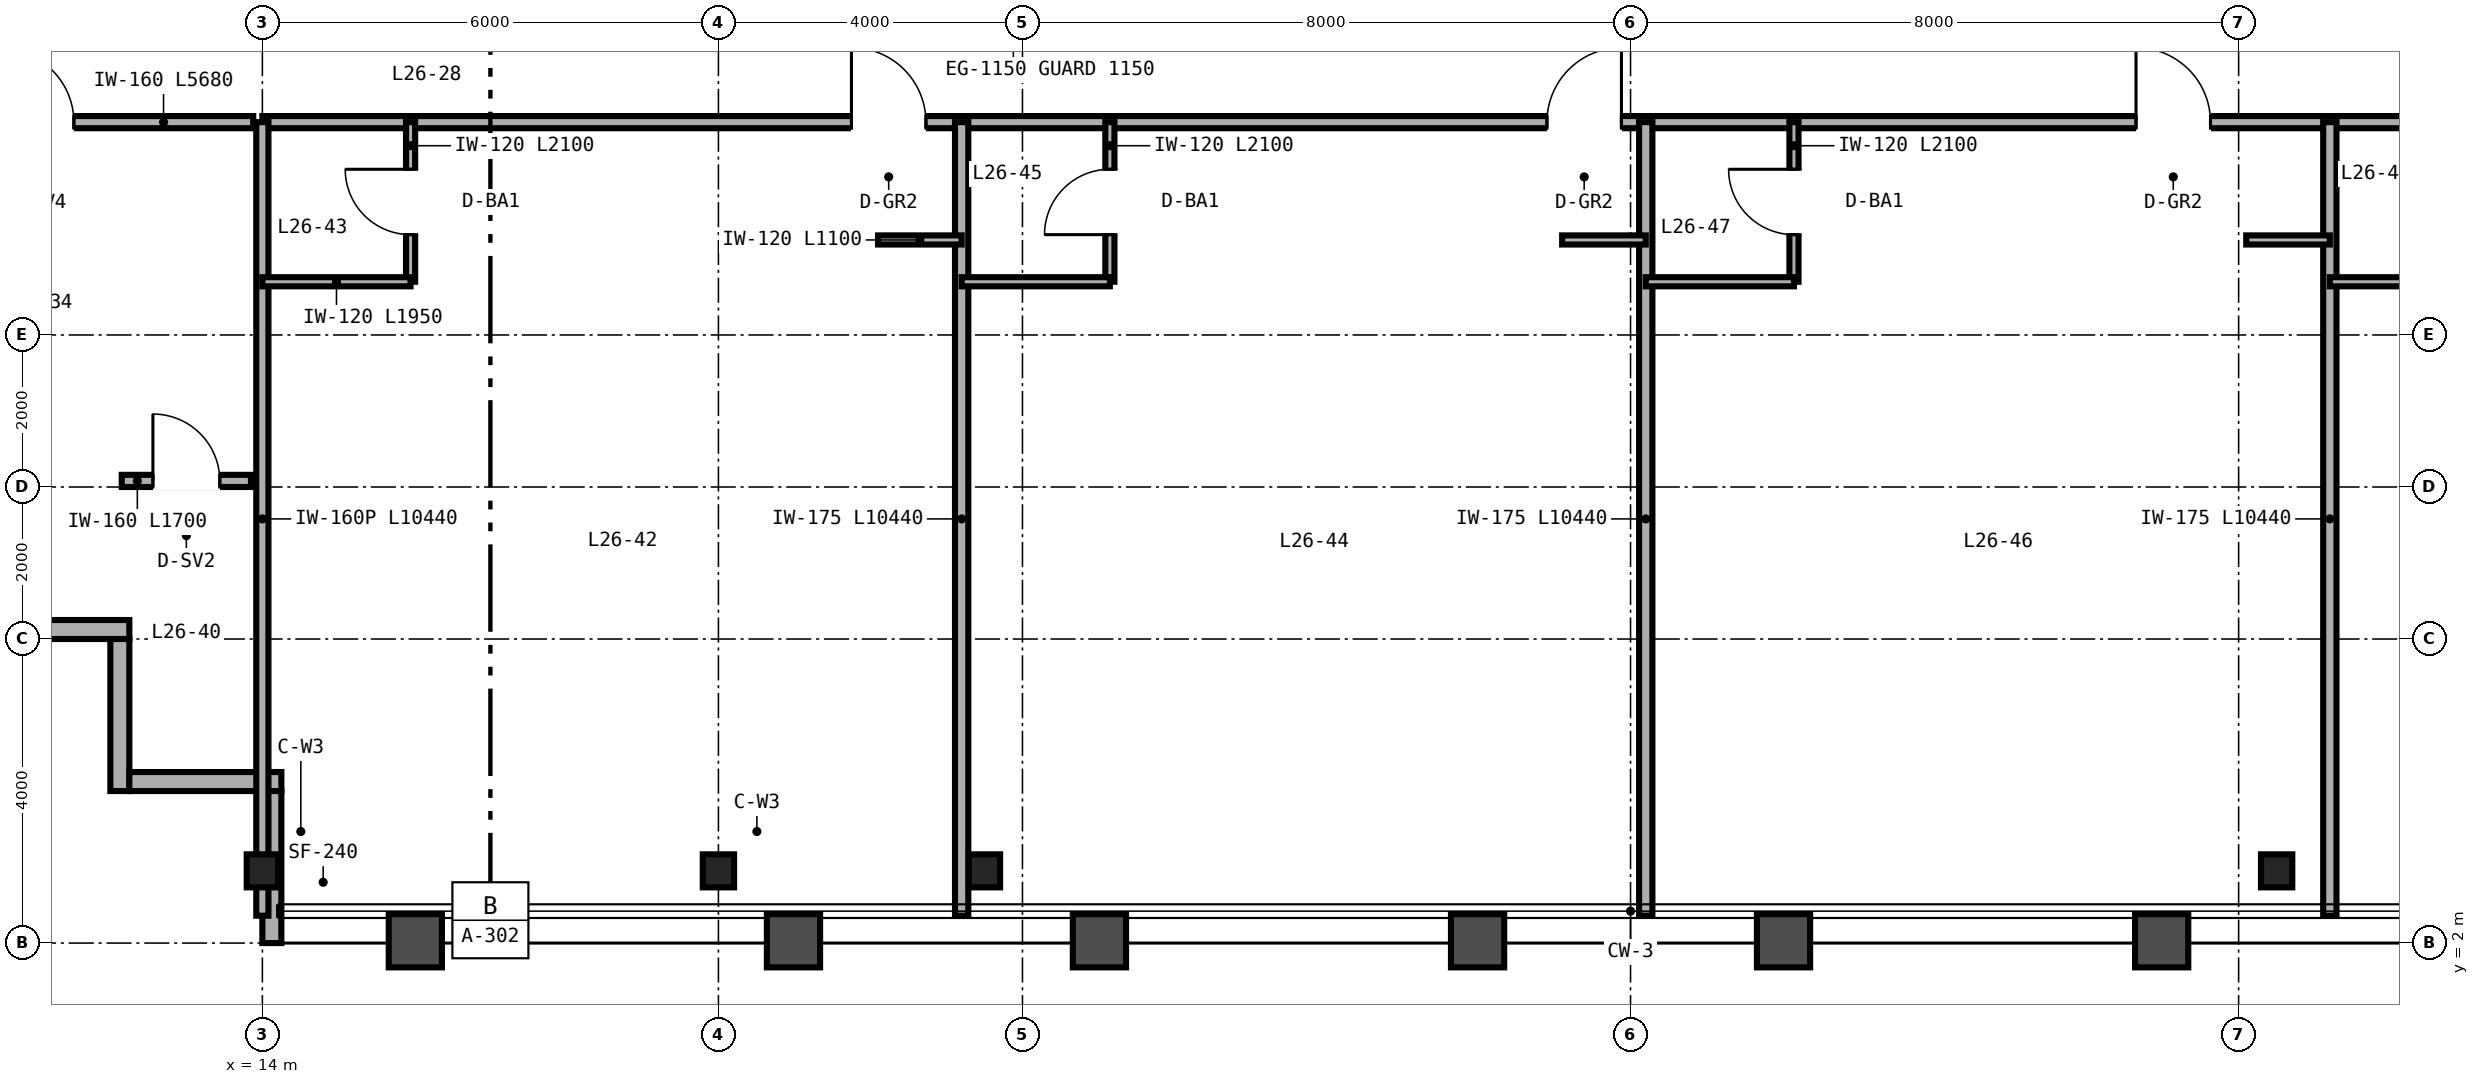
"""IFC4 building model, lengths in metres.
Left out: names, types, materials, properties, quantities, classifications, styles, units other than length and angle.
Written with IfcOpenShell. Run it as: python <this file> out.ifc"""

import sys

from ifc_helpers import new_model, si_unit, direction, frame, frame_2d, origin, origin_2d, place, context, subcontext, project, spatial, rectangle, i_section, extrude, source, transform, mapped, element, fill, save


model = new_model("IFC4")
c1 = context("Model", 3, precision=1e-05, world=origin(), true_north=direction((0.0, 1.0)))
c2 = subcontext(c1, "Body", "Model", "MODEL_VIEW")
j1 = project(units=[si_unit("LENGTHUNIT", "METRE"), si_unit("PLANEANGLEUNIT", "RADIAN")], contexts=[c1])
p1 = place(None, origin())
s1 = spatial("IfcSite", under=j1, at=p1, CompositionType="ELEMENT")
p2 = place(p1, origin())
s2 = spatial("IfcBuilding", under=s1, at=p2, CompositionType="ELEMENT")
p3 = place(p2, frame((0.0, 0.0, 108.0)))
s3 = spatial("IfcBuildingStorey", under=s2, at=p3, CompositionType="ELEMENT", Elevation=108.0)
m1 = source(origin(), c2, "Body", "SweptSolid", [
    extrude(i_section(OverallWidth=0.412, OverallDepth=0.435, WebThickness=0.036, FlangeThickness=0.057, FilletRadius=0.025, at=origin_2d()), origin(), (0.0, 0.0, 1.0), 3.36),
])
for number, where, z_axis, x_axis in (
    (1, (14.0, 2.95, 0.0), (0.0, 0.0, 1.0), (1.0, 0.0, 0.0)),
    (2, (20.0, 2.95, 0.0), (0.0, 0.0, 1.0), (1.0, 0.0, 0.0)),
    (3, (23.5, 2.95, 0.0), (0.0, 0.0, 1.0), (1.0, 0.0, 0.0)),
    (4, (40.5, 2.95, 0.0), (0.0, 0.0, 1.0), (1.0, 0.0, 0.0)),
):
    element("IfcColumn", number, at=place(p3, frame(where, z_axis=z_axis, x_axis=x_axis)), inside=s3, PredefinedType="COLUMN", context=c2, shape_type="MappedRepresentation", body=[
        mapped(m1, transform((0.0, 0.0, 0.0), scale=1.0)),
    ])
for number, where, z_axis, x_axis in (
    (5, (10.25, 6.125, 0.0), (0.0, 0.0, 1.0), (1.0, 0.0, 0.0)),
    (6, (12.125, 6.0, 0.0), (0.0, 0.0, 1.0), (0.0, -1.0, 0.0)),
    (7, (12.25, 4.125, 0.0), (0.0, 0.0, 1.0), (1.0, 0.0, 0.0)),
):
    element("IfcWall", number, at=place(p3, frame(where, z_axis=z_axis, x_axis=x_axis)), inside=s3, PredefinedType="SOLIDWALL", context=c2, shape_type="SweptSolid", body=[
        extrude(rectangle(XDim=2.0, YDim=0.25, at=frame_2d((1.0, 0.0))), origin(), (0.0, 0.0, 1.0), 3.36),
    ])
p4 = place(p3, frame((14.125, 4.0, 0.0), z_axis=(0.0, 0.0, 1.0), x_axis=(0.0, -1.0, 0.0)))
e8 = element("IfcWall", 8, at=p4, inside=s3, PredefinedType="SOLIDWALL", context=c2, shape_type="SweptSolid", body=[
    extrude(rectangle(XDim=2.0, YDim=0.25, at=frame_2d((1.0, 0.0))), origin(), (0.0, 0.0, 1.0), 2.667),
])
p5 = place(p3, frame((8.2, 12.8, 0.0), z_axis=(0.0, 0.0, 1.0), x_axis=(1.0, 0.0, 0.0)))
e9 = element("IfcWall", 9, at=p5, inside=s3, PredefinedType="PARTITIONING", context=c2, shape_type="SweptSolid", body=[
    extrude(rectangle(XDim=5.68, YDim=0.16, at=frame_2d((2.84, 0.0))), origin(), (0.0, 0.0, 1.0), 3.36),
])
p6 = place(p5, frame((2.36, 0.0, 0.0)))
e10 = element("IfcOpeningElement", 10, at=p6, cuts=e9, PredefinedType="OPENING", context=c2, shape_type="SweptSolid", body=[
    extrude(rectangle(XDim=0.96, YDim=2.15, at=frame_2d((0.48, 1.075))), frame((0.0, 0.09, 0.0), z_axis=(0.0, -1.0, 0.0), x_axis=(1.0, 0.0, 0.0)), (0.0, 0.0, 1.0), 0.18),
])
p7 = place(p3, frame((12.15, 8.08, 0.0), z_axis=(0.0, 0.0, 1.0), x_axis=(1.0, 0.0, 0.0)))
e11 = element("IfcWall", 11, at=p7, inside=s3, PredefinedType="PARTITIONING", context=c2, shape_type="SweptSolid", body=[
    extrude(rectangle(XDim=1.7, YDim=0.16, at=frame_2d((0.85, 0.0))), origin(), (0.0, 0.0, 1.0), 3.36),
])
p8 = place(p7, frame((0.41, 0.0, 0.0)))
e12 = element("IfcOpeningElement", 12, at=p8, cuts=e11, PredefinedType="OPENING", context=c2, shape_type="SweptSolid", body=[
    extrude(rectangle(XDim=0.88, YDim=2.15, at=frame_2d((0.44, 1.075))), frame((0.0, 0.09, 0.0), z_axis=(0.0, -1.0, 0.0), x_axis=(1.0, 0.0, 0.0)), (0.0, 0.0, 1.0), 0.18),
])
p9 = place(p3, frame((14.0, 12.8, 0.0), z_axis=(0.0, 0.0, 1.0), x_axis=(1.0, 0.0, 0.0)))
e13 = element("IfcWall", 13, at=p9, inside=s3, PredefinedType="PARTITIONING", context=c2, shape_type="SweptSolid", body=[
    extrude(rectangle(XDim=36.0, YDim=0.16, at=frame_2d((18.0, 0.0))), origin(), (0.0, 0.0, 1.0), 2.581),
])
p10 = place(p9, frame((7.75, 0.0, 0.0)))
e14 = element("IfcOpeningElement", 14, at=p10, cuts=e13, PredefinedType="OPENING", context=c2, shape_type="SweptSolid", body=[
    extrude(rectangle(XDim=0.98, YDim=2.2, at=frame_2d((0.49, 1.1))), frame((0.0, 0.09, 0.0), z_axis=(0.0, -1.0, 0.0), x_axis=(1.0, 0.0, 0.0)), (0.0, 0.0, 1.0), 0.18),
])
p11 = place(p9, frame((16.9, 0.0, 0.0)))
e15 = element("IfcOpeningElement", 15, at=p11, cuts=e13, PredefinedType="OPENING", context=c2, shape_type="SweptSolid", body=[
    extrude(rectangle(XDim=0.98, YDim=2.2, at=frame_2d((0.49, 1.1))), frame((0.0, 0.09, 0.0), z_axis=(0.0, -1.0, 0.0), x_axis=(1.0, 0.0, 0.0)), (0.0, 0.0, 1.0), 0.18),
])
p12 = place(p9, frame((24.65, 0.0, 0.0)))
e16 = element("IfcOpeningElement", 16, at=p12, cuts=e13, PredefinedType="OPENING", context=c2, shape_type="SweptSolid", body=[
    extrude(rectangle(XDim=0.98, YDim=2.2, at=frame_2d((0.49, 1.1))), frame((0.0, 0.09, 0.0), z_axis=(0.0, -1.0, 0.0), x_axis=(1.0, 0.0, 0.0)), (0.0, 0.0, 1.0), 0.18),
])
p13 = place(p9, frame((34.7, 0.0, 0.0)))
e17 = element("IfcOpeningElement", 17, at=p13, cuts=e13, PredefinedType="OPENING", context=c2, shape_type="SweptSolid", body=[
    extrude(rectangle(XDim=0.98, YDim=2.2, at=frame_2d((0.49, 1.1))), frame((0.0, 0.09, 0.0), z_axis=(0.0, -1.0, 0.0), x_axis=(1.0, 0.0, 0.0)), (0.0, 0.0, 1.0), 0.18),
])
p14 = place(p3, frame((14.0, 2.36, 0.0), z_axis=(0.0, 0.0, 1.0), x_axis=(0.0, 1.0, 0.0)))
e18 = element("IfcWall", 18, at=p14, inside=s3, PredefinedType="PARTITIONING", context=c2, shape_type="SweptSolid", body=[
    extrude(rectangle(XDim=10.44, YDim=0.16, at=frame_2d((5.22, 0.0))), origin(), (0.0, 0.0, 1.0), 2.667),
])
p15 = place(p3, frame((23.2, 2.36, 0.0), z_axis=(0.0, 0.0, 1.0), x_axis=(0.0, 1.0, 0.0)))
e19 = element("IfcWall", 19, at=p15, inside=s3, PredefinedType="PARTITIONING", context=c2, shape_type="SweptSolid", body=[
    extrude(rectangle(XDim=10.44, YDim=0.175, at=frame_2d((5.22, 0.0))), origin(), (0.0, 0.0, 1.0), 2.433),
])
p16 = place(p3, frame((15.95, 10.7, 0.0), z_axis=(0.0, 0.0, 1.0), x_axis=(0.0, 1.0, 0.0)))
e20 = element("IfcWall", 20, at=p16, inside=s3, PredefinedType="PARTITIONING", context=c2, shape_type="SweptSolid", body=[
    extrude(rectangle(XDim=2.1, YDim=0.12, at=frame_2d((1.05, 0.0))), origin(), (0.0, 0.0, 1.0), 3.36),
])
p17 = place(p16, frame((0.62, 0.0, 0.0)))
e21 = element("IfcOpeningElement", 21, at=p17, cuts=e20, PredefinedType="OPENING", context=c2, shape_type="SweptSolid", body=[
    extrude(rectangle(XDim=0.86, YDim=2.1, at=frame_2d((0.43, 1.05))), frame((0.0, 0.07, 0.0), z_axis=(0.0, -1.0, 0.0), x_axis=(1.0, 0.0, 0.0)), (0.0, 0.0, 1.0), 0.14),
])
p18 = place(p3, frame((14.0, 10.7, 0.0), z_axis=(0.0, 0.0, 1.0), x_axis=(1.0, 0.0, 0.0)))
e22 = element("IfcWall", 22, at=p18, inside=s3, PredefinedType="PARTITIONING", context=c2, shape_type="SweptSolid", body=[
    extrude(rectangle(XDim=1.95, YDim=0.12, at=frame_2d((0.975, 0.0))), origin(), (0.0, 0.0, 1.0), 3.36),
])
p19 = place(p3, frame((22.1, 11.25, 0.0), z_axis=(0.0, 0.0, 1.0), x_axis=(1.0, 0.0, 0.0)))
e23 = element("IfcWall", 23, at=p19, inside=s3, PredefinedType="PARTITIONING", context=c2, shape_type="SweptSolid", body=[
    extrude(rectangle(XDim=1.1, YDim=0.12, at=frame_2d((0.55, 0.0))), origin(), (0.0, 0.0, 1.0), 3.36),
])
p20 = place(p3, frame((32.2, 2.36, 0.0), z_axis=(0.0, 0.0, 1.0), x_axis=(0.0, 1.0, 0.0)))
e24 = element("IfcWall", 24, at=p20, inside=s3, PredefinedType="PARTITIONING", context=c2, shape_type="SweptSolid", body=[
    extrude(rectangle(XDim=10.44, YDim=0.175, at=frame_2d((5.22, 0.0))), origin(), (0.0, 0.0, 1.0), 2.433),
])
p21 = place(p3, frame((25.15, 10.7, 0.0), z_axis=(0.0, 0.0, 1.0), x_axis=(0.0, 1.0, 0.0)))
e25 = element("IfcWall", 25, at=p21, inside=s3, PredefinedType="PARTITIONING", context=c2, shape_type="SweptSolid", body=[
    extrude(rectangle(XDim=2.1, YDim=0.12, at=frame_2d((1.05, 0.0))), origin(), (0.0, 0.0, 1.0), 3.36),
])
p22 = place(p21, frame((0.62, 0.0, 0.0)))
e26 = element("IfcOpeningElement", 26, at=p22, cuts=e25, PredefinedType="OPENING", context=c2, shape_type="SweptSolid", body=[
    extrude(rectangle(XDim=0.86, YDim=2.1, at=frame_2d((0.43, 1.05))), frame((0.0, 0.07, 0.0), z_axis=(0.0, -1.0, 0.0), x_axis=(1.0, 0.0, 0.0)), (0.0, 0.0, 1.0), 0.14),
])
p23 = place(p3, frame((23.2, 10.7, 0.0), z_axis=(0.0, 0.0, 1.0), x_axis=(1.0, 0.0, 0.0)))
e27 = element("IfcWall", 27, at=p23, inside=s3, PredefinedType="PARTITIONING", context=c2, shape_type="SweptSolid", body=[
    extrude(rectangle(XDim=1.95, YDim=0.12, at=frame_2d((0.975, 0.0))), origin(), (0.0, 0.0, 1.0), 2.581),
])
p24 = place(p3, frame((31.1, 11.25, 0.0), z_axis=(0.0, 0.0, 1.0), x_axis=(1.0, 0.0, 0.0)))
e28 = element("IfcWall", 28, at=p24, inside=s3, PredefinedType="PARTITIONING", context=c2, shape_type="SweptSolid", body=[
    extrude(rectangle(XDim=1.1, YDim=0.12, at=frame_2d((0.55, 0.0))), origin(), (0.0, 0.0, 1.0), 3.36),
])
p25 = place(p3, frame((41.2, 2.36, 0.0), z_axis=(0.0, 0.0, 1.0), x_axis=(0.0, 1.0, 0.0)))
e29 = element("IfcWall", 29, at=p25, inside=s3, PredefinedType="PARTITIONING", context=c2, shape_type="SweptSolid", body=[
    extrude(rectangle(XDim=10.44, YDim=0.175, at=frame_2d((5.22, 0.0))), origin(), (0.0, 0.0, 1.0), 2.823),
])
p26 = place(p3, frame((34.15, 10.7, 0.0), z_axis=(0.0, 0.0, 1.0), x_axis=(0.0, 1.0, 0.0)))
e30 = element("IfcWall", 30, at=p26, inside=s3, PredefinedType="PARTITIONING", context=c2, shape_type="SweptSolid", body=[
    extrude(rectangle(XDim=2.1, YDim=0.12, at=frame_2d((1.05, 0.0))), origin(), (0.0, 0.0, 1.0), 3.36),
])
p27 = place(p26, frame((0.62, 0.0, 0.0)))
e31 = element("IfcOpeningElement", 31, at=p27, cuts=e30, PredefinedType="OPENING", context=c2, shape_type="SweptSolid", body=[
    extrude(rectangle(XDim=0.86, YDim=2.1, at=frame_2d((0.43, 1.05))), frame((0.0, 0.07, 0.0), z_axis=(0.0, -1.0, 0.0), x_axis=(1.0, 0.0, 0.0)), (0.0, 0.0, 1.0), 0.14),
])
p28 = place(p3, frame((32.2, 10.7, 0.0), z_axis=(0.0, 0.0, 1.0), x_axis=(1.0, 0.0, 0.0)))
e32 = element("IfcWall", 32, at=p28, inside=s3, PredefinedType="PARTITIONING", context=c2, shape_type="SweptSolid", body=[
    extrude(rectangle(XDim=1.95, YDim=0.12, at=frame_2d((0.975, 0.0))), origin(), (0.0, 0.0, 1.0), 3.36),
])
p29 = place(p3, frame((40.1, 11.25, 0.0), z_axis=(0.0, 0.0, 1.0), x_axis=(1.0, 0.0, 0.0)))
e33 = element("IfcWall", 33, at=p29, inside=s3, PredefinedType="PARTITIONING", context=c2, shape_type="SweptSolid", body=[
    extrude(rectangle(XDim=1.1, YDim=0.12, at=frame_2d((0.55, 0.0))), origin(), (0.0, 0.0, 1.0), 2.581),
])
p30 = place(p3, frame((41.2, 10.7, 0.0), z_axis=(0.0, 0.0, 1.0), x_axis=(1.0, 0.0, 0.0)))
e34 = element("IfcWall", 34, at=p30, inside=s3, PredefinedType="PARTITIONING", context=c2, shape_type="SweptSolid", body=[
    extrude(rectangle(XDim=1.95, YDim=0.12, at=frame_2d((0.975, 0.0))), origin(), (0.0, 0.0, 1.0), 3.36),
])
m2 = source(origin(), c2, "Body", "SweptSolid", [
    extrude(rectangle(XDim=0.96, YDim=2.15, at=frame_2d((0.48, 1.075))), frame((0.0, 0.025, 0.0), z_axis=(0.0, -1.0, 0.0), x_axis=(1.0, 0.0, 0.0)), (0.0, 0.0, 1.0), 0.05),
])
p31 = place(p6, origin())
e35 = element("IfcDoor", 35, at=p31, inside=s3, OperationType="SINGLE_SWING_LEFT", PredefinedType="DOOR", context=c2, shape_type="MappedRepresentation", body=[
    mapped(m2, transform((0.0, 0.0, 0.0), scale=1.0)),
])
fill(e10, e35)
m3 = source(origin(), c2, "Body", "SweptSolid", [
    extrude(rectangle(XDim=0.88, YDim=2.15, at=frame_2d((0.44, 1.075))), frame((0.0, 0.025, 0.0), z_axis=(0.0, -1.0, 0.0), x_axis=(1.0, 0.0, 0.0)), (0.0, 0.0, 1.0), 0.05),
])
p32 = place(p8, origin())
e36 = element("IfcDoor", 36, at=p32, inside=s3, OperationType="SINGLE_SWING_LEFT", PredefinedType="DOOR", context=c2, shape_type="MappedRepresentation", body=[
    mapped(m3, transform((0.0, 0.0, 0.0), scale=1.0)),
])
fill(e12, e36)
m4 = source(origin(), c2, "Body", "SweptSolid", [
    extrude(rectangle(XDim=0.86, YDim=2.1, at=frame_2d((0.43, 1.05))), frame((0.0, 0.025, 0.0), z_axis=(0.0, -1.0, 0.0), x_axis=(1.0, 0.0, 0.0)), (0.0, 0.0, 1.0), 0.05),
])
p33 = place(p17, origin())
e37 = element("IfcDoor", 37, at=p33, inside=s3, OperationType="SINGLE_SWING_RIGHT", PredefinedType="DOOR", context=c2, shape_type="MappedRepresentation", body=[
    mapped(m4, transform((0.0, 0.0, 0.0), scale=1.0)),
])
fill(e21, e37)
p34 = place(p22, origin())
e38 = element("IfcDoor", 38, at=p34, inside=s3, OperationType="SINGLE_SWING_LEFT", PredefinedType="DOOR", context=c2, shape_type="MappedRepresentation", body=[
    mapped(m4, transform((0.0, 0.0, 0.0), scale=1.0)),
])
fill(e26, e38)
p35 = place(p27, origin())
e39 = element("IfcDoor", 39, at=p35, inside=s3, OperationType="SINGLE_SWING_RIGHT", PredefinedType="DOOR", context=c2, shape_type="MappedRepresentation", body=[
    mapped(m4, transform((0.0, 0.0, 0.0), scale=1.0)),
])
fill(e31, e39)
m5 = source(origin(), c2, "Body", "SweptSolid", [
    extrude(rectangle(XDim=0.98, YDim=2.2, at=frame_2d((0.49, 1.1))), frame((0.0, 0.025, 0.0), z_axis=(0.0, -1.0, 0.0), x_axis=(1.0, 0.0, 0.0)), (0.0, 0.0, 1.0), 0.05),
])
p36 = place(p10, origin())
e40 = element("IfcDoor", 40, at=p36, inside=s3, OperationType="SINGLE_SWING_LEFT", PredefinedType="DOOR", context=c2, shape_type="MappedRepresentation", body=[
    mapped(m5, transform((0.0, 0.0, 0.0), scale=1.0)),
])
fill(e14, e40)
p37 = place(p11, origin())
e41 = element("IfcDoor", 41, at=p37, inside=s3, OperationType="SINGLE_SWING_RIGHT", PredefinedType="DOOR", context=c2, shape_type="MappedRepresentation", body=[
    mapped(m5, transform((0.0, 0.0, 0.0), scale=1.0)),
])
fill(e15, e41)
p38 = place(p12, origin())
e42 = element("IfcDoor", 42, at=p38, inside=s3, OperationType="SINGLE_SWING_LEFT", PredefinedType="DOOR", context=c2, shape_type="MappedRepresentation", body=[
    mapped(m5, transform((0.0, 0.0, 0.0), scale=1.0)),
])
fill(e16, e42)
save(model, sys.argv[1])
